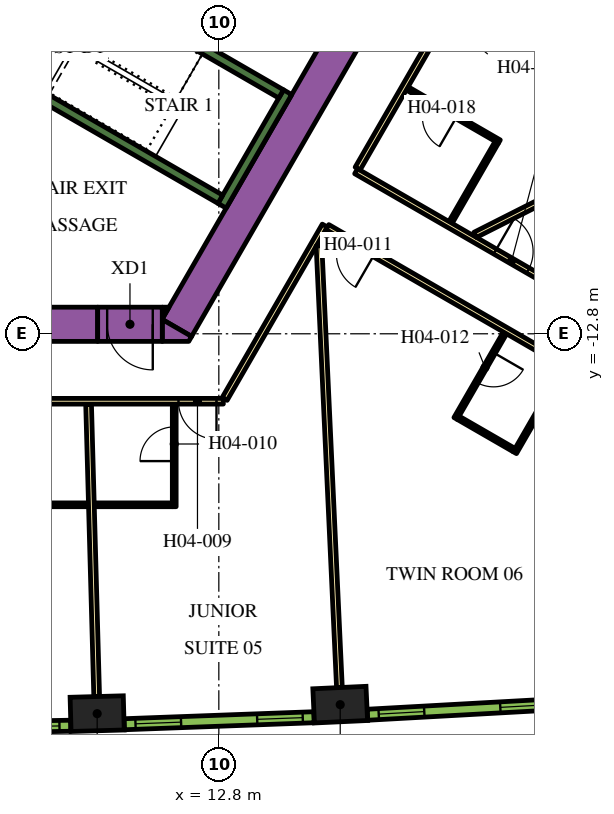
"""IFC4 building model, lengths in metres.
Left out: names, types, materials, properties, quantities, classifications, styles, units other than length and angle.
Written with IfcOpenShell. Run it as: python <this file> out.ifc"""

import sys

from ifc_helpers import new_model, si_unit, direction, frame, frame_2d, origin, origin_2d, place, context, subcontext, project, spatial, polyline, rectangle, outline, extrude, element, fill, save


model = new_model("IFC4")
c1 = context("Model", 3, precision=1e-05, world=origin(), true_north=direction((0.0, 1.0)))
c2 = subcontext(c1, "Body", "Model", "MODEL_VIEW")
j1 = project(units=[si_unit("LENGTHUNIT", "METRE"), si_unit("PLANEANGLEUNIT", "RADIAN")], contexts=[c1])
p1 = place(None, origin())
s1 = spatial("IfcSite", under=j1, at=p1, CompositionType="ELEMENT")
p2 = place(p1, origin())
s2 = spatial("IfcBuilding", under=s1, at=p2, CompositionType="ELEMENT")
p3 = place(p2, frame((0.0, 0.0, 62.7)))
s3 = spatial("IfcBuildingStorey", under=s2, at=p3, CompositionType="ELEMENT", Elevation=62.7)
for number, where, z_axis, x_axis in (
    (1, (9.599, -22.795, 0.0), (0.0, 0.0, 1.0), (1.0, 0.028, 0.0)),
    (2, (15.994, -22.558, 0.0), (0.0, 0.0, 1.0), (0.999, 0.046, 0.0)),
):
    element("IfcColumn", number, at=place(p3, frame(where, z_axis=z_axis, x_axis=x_axis)), inside=s3, PredefinedType="COLUMN", context=c2, shape_type="SweptSolid", body=[
        extrude(rectangle(XDim=1.4, YDim=0.9, at=origin_2d()), origin(), (0.0, 0.0, 1.0), 3.9),
    ])
p4 = place(p3, frame((11.695, -12.644, 0.0), z_axis=(0.0, 0.0, 1.0), x_axis=(0.500010229568, 0.86601949766, 0.0)))
e3 = element("IfcWall", 3, at=p4, inside=s3, PredefinedType="SOLIDWALL", context=c2, shape_type="SweptSolid", body=[
    extrude(rectangle(XDim=9.326, YDim=0.9, at=frame_2d((4.663, 0.0))), origin(), (0.0, 0.0, 1.0), 3.9),
])
p5 = place(p3, origin())
e4 = element("IfcWall", 4, at=p5, inside=s3, PredefinedType="SOLIDWALL", context=c2, shape_type="SweptSolid", body=[
    extrude(outline(polyline([(12.009, -13.0), (11.312, -13.0), (11.312, -12.425), (12.083, -12.871), (12.009, -13.0)])), origin(), (0.0, 0.0, 1.0), 3.9),
])
e5 = element("IfcWall", 5, at=p5, inside=s3, PredefinedType="SOLIDWALL", context=c2, shape_type="SweptSolid", body=[
    extrude(outline(polyline([(11.489, -12.1), (11.312, -12.407), (11.312, -12.1), (11.489, -12.1)])), origin(), (0.0, 0.0, 1.0), 3.9),
])
p6 = place(p3, frame((-12.019, -12.55, 0.0), z_axis=(0.0, 0.0, 1.0), x_axis=(1.0, 0.0, 0.0)))
e6 = element("IfcWall", 6, at=p6, inside=s3, PredefinedType="SOLIDWALL", context=c2, shape_type="SweptSolid", body=[
    extrude(rectangle(XDim=21.63, YDim=0.9, at=frame_2d((10.815, 0.0))), origin(), (0.0, 0.0, 1.0), 3.9),
])
p7 = place(p3, frame((12.885, -9.431, 0.0), z_axis=(0.0, 0.0, 1.0), x_axis=(0.500020560727, 0.866013532718, 0.0)))
e7 = element("IfcWall", 7, at=p7, inside=s3, PredefinedType="SOLIDWALL", context=c2, shape_type="SweptSolid", body=[
    extrude(rectangle(XDim=3.45, YDim=0.25, at=frame_2d((1.725, 0.0))), origin(), (0.0, 0.0, 1.0), 3.9),
])
p8 = place(p3, frame((12.84, -9.261, 0.0), z_axis=(0.0, 0.0, 1.0), x_axis=(-0.866013990052, 0.500019768644, 0.0)))
e8 = element("IfcWall", 8, at=p8, inside=s3, PredefinedType="SOLIDWALL", context=c2, shape_type="SweptSolid", body=[
    extrude(rectangle(XDim=6.8, YDim=0.25, at=frame_2d((3.4, 0.0))), origin(), (0.0, 0.0, 1.0), 3.9),
])
p9 = place(p3, frame((8.334, -2.964, 0.0), z_axis=(0.0, 0.0, 1.0), x_axis=(0.866016039709, -0.500016218704, 0.0)))
e9 = element("IfcWall", 9, at=p9, inside=s3, PredefinedType="SOLIDWALL", context=c2, shape_type="SweptSolid", body=[
    extrude(rectangle(XDim=7.05, YDim=0.25, at=frame_2d((3.525, 0.0))), origin(), (0.0, 0.0, 1.0), 3.9),
])
p10 = place(p3, frame((11.312, -12.55, 0.0), z_axis=(0.0, 0.0, 1.0), x_axis=(-1.0, 0.0, 0.0)))
e10 = element("IfcWall", 10, at=p10, inside=s3, PredefinedType="SOLIDWALL", context=c2, shape_type="SweptSolid", body=[
    extrude(rectangle(XDim=1.7, YDim=0.9, at=frame_2d((0.85, 0.0))), origin(), (0.0, 0.0, 1.0), 3.9),
])
p11 = place(p10, frame((0.25, 0.0, 0.0)))
e11 = element("IfcOpeningElement", 11, at=p11, cuts=e10, PredefinedType="OPENING", context=c2, shape_type="SweptSolid", body=[
    extrude(rectangle(XDim=1.2, YDim=2.1, at=frame_2d((0.6, 1.05))), frame((0.0, 0.46, 0.0), z_axis=(0.0, -1.0, 0.0), x_axis=(1.0, 0.0, 0.0)), (0.0, 0.0, 1.0), 0.92),
])
p12 = place(p3, frame((16.412, -8.523, 0.0), z_axis=(0.0, 0.0, 1.0), x_axis=(0.866022197818, -0.500005552856, 0.0)))
e12 = element("IfcWall", 12, at=p12, inside=s3, PredefinedType="PARTITIONING", context=c2, shape_type="SweptSolid", body=[
    extrude(rectangle(XDim=16.224, YDim=0.15, at=frame_2d((8.112, 0.0))), origin(), (0.0, 0.0, 1.0), 2.75),
])
p13 = place(p12, frame((4.223, 0.0, 0.0)))
e13 = element("IfcOpeningElement", 13, at=p13, cuts=e12, PredefinedType="OPENING", context=c2, shape_type="SweptSolid", body=[
    extrude(rectangle(XDim=1.0, YDim=2.1, at=frame_2d((0.5, 1.05))), frame((0.0, 0.085, 0.0), z_axis=(0.0, -1.0, 0.0), x_axis=(1.0, 0.0, 0.0)), (0.0, 0.0, 1.0), 0.17),
])
p14 = place(p3, frame((19.081, -3.9, 0.0), z_axis=(0.0, 0.0, 1.0), x_axis=(-0.499974327079, -0.866040225545, 0.0)))
e14 = element("IfcWall", 14, at=p14, inside=s3, PredefinedType="PARTITIONING", context=c2, shape_type="SweptSolid", body=[
    extrude(rectangle(XDim=5.258, YDim=0.15, at=frame_2d((2.629, 0.0))), origin(), (0.0, 0.0, 1.0), 2.75),
])
p15 = place(p14, frame((0.18, 0.0, 0.0)))
e15 = element("IfcOpeningElement", 15, at=p15, cuts=e14, PredefinedType="OPENING", context=c2, shape_type="SweptSolid", body=[
    extrude(rectangle(XDim=1.0, YDim=2.1, at=frame_2d((0.5, 1.05))), frame((0.0, 0.085, 0.0), z_axis=(0.0, -1.0, 0.0), x_axis=(1.0, 0.0, 0.0)), (0.0, 0.0, 1.0), 0.17),
])
p16 = place(p3, frame((12.918, -14.575, 0.0), z_axis=(0.0, 0.0, 1.0), x_axis=(-1.0, 0.0, 0.0)))
e16 = element("IfcWall", 16, at=p16, inside=s3, PredefinedType="PARTITIONING", context=c2, shape_type="SweptSolid", body=[
    extrude(rectangle(XDim=25.766, YDim=0.15, at=frame_2d((12.883, 0.0))), origin(), (0.0, 0.0, 1.0), 2.75),
])
p17 = place(p16, frame((24.586, 0.0, 0.0)))
e17 = element("IfcOpeningElement", 17, at=p17, cuts=e16, PredefinedType="OPENING", context=c2, shape_type="SweptSolid", body=[
    extrude(rectangle(XDim=1.0, YDim=2.1, at=frame_2d((0.5, 1.05))), frame((0.0, 0.085, 0.0), z_axis=(0.0, -1.0, 0.0), x_axis=(1.0, 0.0, 0.0)), (0.0, 0.0, 1.0), 0.17),
])
p18 = place(p16, frame((9.948, 0.0, 0.0)))
e18 = element("IfcOpeningElement", 18, at=p18, cuts=e16, PredefinedType="OPENING", context=c2, shape_type="SweptSolid", body=[
    extrude(rectangle(XDim=1.0, YDim=2.1, at=frame_2d((0.5, 1.05))), frame((0.0, 0.085, 0.0), z_axis=(0.0, -1.0, 0.0), x_axis=(1.0, 0.0, 0.0)), (0.0, 0.0, 1.0), 0.17),
])
p19 = place(p16, frame((8.642, 0.0, 0.0)))
e19 = element("IfcOpeningElement", 19, at=p19, cuts=e16, PredefinedType="OPENING", context=c2, shape_type="SweptSolid", body=[
    extrude(rectangle(XDim=1.0, YDim=2.1, at=frame_2d((0.5, 1.05))), frame((0.0, 0.085, 0.0), z_axis=(0.0, -1.0, 0.0), x_axis=(1.0, 0.0, 0.0)), (0.0, 0.0, 1.0), 0.17),
])
p20 = place(p16, frame((0.18, 0.0, 0.0)))
e20 = element("IfcOpeningElement", 20, at=p20, cuts=e16, PredefinedType="OPENING", context=c2, shape_type="SweptSolid", body=[
    extrude(rectangle(XDim=1.0, YDim=2.1, at=frame_2d((0.5, 1.05))), frame((0.0, 0.085, 0.0), z_axis=(0.0, -1.0, 0.0), x_axis=(1.0, 0.0, 0.0)), (0.0, 0.0, 1.0), 0.17),
])
p21 = place(p3, frame((15.587, -9.952, 0.0), z_axis=(0.0, 0.0, 1.0), x_axis=(-0.500016618951, -0.866015808616, 0.0)))
e21 = element("IfcWall", 21, at=p21, inside=s3, PredefinedType="PARTITIONING", context=c2, shape_type="SweptSolid", body=[
    extrude(rectangle(XDim=5.268, YDim=0.15, at=frame_2d((2.634, 0.0))), origin(), (0.0, 0.0, 1.0), 2.75),
])
p22 = place(p3, frame((29.638, -18.064, 0.0), z_axis=(0.0, 0.0, 1.0), x_axis=(-0.866026175601, 0.499998663172, 0.0)))
e22 = element("IfcWall", 22, at=p22, inside=s3, PredefinedType="PARTITIONING", context=c2, shape_type="SweptSolid", body=[
    extrude(rectangle(XDim=16.144, YDim=0.15, at=frame_2d((8.072, 0.0))), origin(), (0.0, 0.0, 1.0), 2.75),
])
p23 = place(p22, frame((14.714, 0.0, 0.0)))
e23 = element("IfcOpeningElement", 23, at=p23, cuts=e22, PredefinedType="OPENING", context=c2, shape_type="SweptSolid", body=[
    extrude(rectangle(XDim=1.0, YDim=2.1, at=frame_2d((0.5, 1.05))), frame((0.0, 0.085, 0.0), z_axis=(0.0, -1.0, 0.0), x_axis=(1.0, 0.0, 0.0)), (0.0, 0.0, 1.0), 0.17),
])
p24 = place(p22, frame((7.275, 0.0, 0.0)))
e24 = element("IfcOpeningElement", 24, at=p24, cuts=e22, PredefinedType="OPENING", context=c2, shape_type="SweptSolid", body=[
    extrude(rectangle(XDim=1.0, YDim=2.1, at=frame_2d((0.5, 1.05))), frame((0.0, 0.085, 0.0), z_axis=(0.0, -1.0, 0.0), x_axis=(1.0, 0.0, 0.0)), (0.0, 0.0, 1.0), 0.17),
])
p25 = place(p3, frame((9.586, -22.345, 0.0), z_axis=(0.0, 0.0, 1.0), x_axis=(-0.027722115646, 0.999615668297, 0.0)))
e25 = element("IfcWall", 25, at=p25, inside=s3, PredefinedType="PARTITIONING", context=c2, shape_type="SweptSolid", body=[
    extrude(rectangle(XDim=7.688, YDim=0.15, at=frame_2d((3.844, 0.0))), origin(), (0.0, 0.0, 1.0), 2.75),
])
p26 = place(p3, frame((15.973, -22.109, 0.0), z_axis=(0.0, 0.0, 1.0), x_axis=(-0.046191717129, 0.998932592955, 0.0)))
e26 = element("IfcWall", 26, at=p26, inside=s3, PredefinedType="PARTITIONING", context=c2, shape_type="SweptSolid", body=[
    extrude(rectangle(XDim=11.638, YDim=0.15, at=frame_2d((5.819, 0.0))), origin(), (0.0, 0.0, 1.0), 2.75),
])
p27 = place(p3, frame((29.12, -5.356, 0.0), z_axis=(0.0, 0.0, 1.0), x_axis=(-0.892401965553, -0.451241323327, 0.0)))
e27 = element("IfcWall", 27, at=p27, inside=s3, PredefinedType="PARTITIONING", context=c2, shape_type="SweptSolid", body=[
    extrude(rectangle(XDim=10.729, YDim=0.15, at=frame_2d((5.364, 0.0))), origin(), (0.0, 0.0, 1.0), 2.75),
])
p28 = place(p3, frame((7.169, -17.3, 0.0), z_axis=(0.0, 0.0, 1.0), x_axis=(1.0, 0.0, 0.0)))
e28 = element("IfcWall", 28, at=p28, inside=s3, PredefinedType="PARTITIONING", context=c2, shape_type="SweptSolid", body=[
    extrude(rectangle(XDim=2.2, YDim=0.1, at=frame_2d((1.1, 0.0))), origin(), (0.0, 0.0, 1.0), 2.75),
])
p29 = place(p3, frame((11.627, -17.35, 0.0), z_axis=(0.0, 0.0, 1.0), x_axis=(0.0, 1.0, 0.0)))
e29 = element("IfcWall", 29, at=p29, inside=s3, PredefinedType="PARTITIONING", context=c2, shape_type="SweptSolid", body=[
    extrude(rectangle(XDim=2.7, YDim=0.1, at=frame_2d((1.35, 0.0))), origin(), (0.0, 0.0, 1.0), 2.75),
])
p30 = place(p29, frame((1.2, 0.0, 0.0)))
e30 = element("IfcOpeningElement", 30, at=p30, cuts=e29, PredefinedType="OPENING", context=c2, shape_type="SweptSolid", body=[
    extrude(rectangle(XDim=0.9, YDim=2.1, at=frame_2d((0.45, 1.05))), frame((0.0, 0.06, 0.0), z_axis=(0.0, -1.0, 0.0), x_axis=(1.0, 0.0, 0.0)), (0.0, 0.0, 1.0), 0.12),
])
p31 = place(p3, frame((11.577, -17.3, 0.0), z_axis=(0.0, 0.0, 1.0), x_axis=(-1.0, 0.0, 0.0)))
e31 = element("IfcWall", 31, at=p31, inside=s3, PredefinedType="PARTITIONING", context=c2, shape_type="SweptSolid", body=[
    extrude(rectangle(XDim=2.05, YDim=0.1, at=frame_2d((1.025, 0.0))), origin(), (0.0, 0.0, 1.0), 2.75),
])
p32 = place(p3, frame((20.33, -12.777, 0.0), z_axis=(0.0, 0.0, 1.0), x_axis=(-0.500006934395, -0.866021400173, 0.0)))
e32 = element("IfcWall", 32, at=p32, inside=s3, PredefinedType="PARTITIONING", context=c2, shape_type="SweptSolid", body=[
    extrude(rectangle(XDim=2.6, YDim=0.1, at=frame_2d((1.3, 0.0))), origin(), (0.0, 0.0, 1.0), 2.75),
])
p33 = place(p32, frame((0.6, 0.0, 0.0)))
e33 = element("IfcOpeningElement", 33, at=p33, cuts=e32, PredefinedType="OPENING", context=c2, shape_type="SweptSolid", body=[
    extrude(rectangle(XDim=0.9, YDim=2.1, at=frame_2d((0.45, 1.05))), frame((0.0, 0.06, 0.0), z_axis=(0.0, -1.0, 0.0), x_axis=(1.0, 0.0, 0.0)), (0.0, 0.0, 1.0), 0.12),
])
p34 = place(p3, frame((19.098, -15.01, 0.0), z_axis=(0.0, 0.0, 1.0), x_axis=(0.86605165483, -0.499954529098, 0.0)))
e34 = element("IfcWall", 34, at=p34, inside=s3, PredefinedType="PARTITIONING", context=c2, shape_type="SweptSolid", body=[
    extrude(rectangle(XDim=1.7, YDim=0.1, at=frame_2d((0.85, 0.0))), origin(), (0.0, 0.0, 1.0), 2.75),
])
p35 = place(p3, frame((21.734, -13.945, 0.0), z_axis=(0.0, 0.0, 1.0), x_axis=(-0.500014693593, -0.866016920268, 0.0)))
e35 = element("IfcWall", 35, at=p35, inside=s3, PredefinedType="PARTITIONING", context=c2, shape_type="SweptSolid", body=[
    extrude(rectangle(XDim=2.29, YDim=0.1, at=frame_2d((1.145, 0.0))), origin(), (0.0, 0.0, 1.0), 2.75),
])
p36 = place(p3, frame((20.182, -7.743, 0.0), z_axis=(0.0, 0.0, 1.0), x_axis=(-0.866034573852, 0.49998411664, 0.0)))
e36 = element("IfcWall", 36, at=p36, inside=s3, PredefinedType="PARTITIONING", context=c2, shape_type="SweptSolid", body=[
    extrude(rectangle(XDim=2.8, YDim=0.1, at=frame_2d((1.4, 0.0))), origin(), (0.0, 0.0, 1.0), 2.75),
])
p37 = place(p36, frame((1.3, 0.0, 0.0)))
e37 = element("IfcOpeningElement", 37, at=p37, cuts=e36, PredefinedType="OPENING", context=c2, shape_type="SweptSolid", body=[
    extrude(rectangle(XDim=0.9, YDim=2.1, at=frame_2d((0.45, 1.05))), frame((0.0, 0.06, 0.0), z_axis=(0.0, -1.0, 0.0), x_axis=(1.0, 0.0, 0.0)), (0.0, 0.0, 1.0), 0.12),
])
p38 = place(p3, frame((20.109, -7.771, 0.0), z_axis=(0.0, 0.0, 1.0), x_axis=(-0.500077573772, -0.865980611914, 0.0)))
e38 = element("IfcWall", 38, at=p38, inside=s3, PredefinedType="PARTITIONING", context=c2, shape_type="SweptSolid", body=[
    extrude(rectangle(XDim=2.42, YDim=0.1, at=frame_2d((1.21, 0.0))), origin(), (0.0, 0.0, 1.0), 2.75),
])
p39 = place(p3, frame((3.906, -23.205, 0.0), z_axis=(0.0, 0.0, 1.0), x_axis=(0.999829529479, 0.018463801951, 0.0)))
e39 = element("IfcWall", 39, at=p39, inside=s3, PredefinedType="SOLIDWALL", context=c2, shape_type="SweptSolid", body=[
    extrude(rectangle(XDim=4.998, YDim=0.29, at=frame_2d((2.499, 0.0))), origin(), (0.0, 0.0, 1.0), 3.65),
])
p40 = place(p39, frame((0.297, 0.0, 0.9)))
e40 = element("IfcOpeningElement", 40, at=p40, cuts=e39, PredefinedType="OPENING", context=c2, shape_type="SweptSolid", body=[
    extrude(rectangle(XDim=1.2, YDim=2.15, at=frame_2d((0.6, 1.075))), frame((0.0, 0.155, 0.0), z_axis=(0.0, -1.0, 0.0), x_axis=(1.0, 0.0, 0.0)), (0.0, 0.0, 1.0), 0.31),
])
p41 = place(p39, frame((3.501, 0.0, 0.9)))
e41 = element("IfcOpeningElement", 41, at=p41, cuts=e39, PredefinedType="OPENING", context=c2, shape_type="SweptSolid", body=[
    extrude(rectangle(XDim=1.2, YDim=2.15, at=frame_2d((0.6, 1.075))), frame((0.0, 0.155, 0.0), z_axis=(0.0, -1.0, 0.0), x_axis=(1.0, 0.0, 0.0)), (0.0, 0.0, 1.0), 0.31),
])
p42 = place(p3, frame((10.31, -23.074, 0.0), z_axis=(0.0, 0.0, 1.0), x_axis=(0.999317974969, 0.036926750529, 0.0)))
e42 = element("IfcWall", 42, at=p42, inside=s3, PredefinedType="SOLIDWALL", context=c2, shape_type="SweptSolid", body=[
    extrude(rectangle(XDim=4.998, YDim=0.29, at=frame_2d((2.499, 0.0))), origin(), (0.0, 0.0, 1.0), 3.65),
])
p43 = place(p42, frame((0.297, 0.0, 0.9)))
e43 = element("IfcOpeningElement", 43, at=p43, cuts=e42, PredefinedType="OPENING", context=c2, shape_type="SweptSolid", body=[
    extrude(rectangle(XDim=1.2, YDim=2.15, at=frame_2d((0.6, 1.075))), frame((0.0, 0.155, 0.0), z_axis=(0.0, -1.0, 0.0), x_axis=(1.0, 0.0, 0.0)), (0.0, 0.0, 1.0), 0.31),
])
p44 = place(p42, frame((3.501, 0.0, 0.9)))
e44 = element("IfcOpeningElement", 44, at=p44, cuts=e42, PredefinedType="OPENING", context=c2, shape_type="SweptSolid", body=[
    extrude(rectangle(XDim=1.2, YDim=2.15, at=frame_2d((0.6, 1.075))), frame((0.0, 0.155, 0.0), z_axis=(0.0, -1.0, 0.0), x_axis=(1.0, 0.0, 0.0)), (0.0, 0.0, 1.0), 0.31),
])
p45 = place(p3, frame((16.711, -22.824, 0.0), z_axis=(0.0, 0.0, 1.0), x_axis=(0.998464708705, 0.055391564976, 0.0)))
e45 = element("IfcWall", 45, at=p45, inside=s3, PredefinedType="SOLIDWALL", context=c2, shape_type="SweptSolid", body=[
    extrude(rectangle(XDim=4.998, YDim=0.29, at=frame_2d((2.499, 0.0))), origin(), (0.0, 0.0, 1.0), 3.65),
])
p46 = place(p45, frame((0.297, 0.0, 0.9)))
e46 = element("IfcOpeningElement", 46, at=p46, cuts=e45, PredefinedType="OPENING", context=c2, shape_type="SweptSolid", body=[
    extrude(rectangle(XDim=1.2, YDim=2.15, at=frame_2d((0.6, 1.075))), frame((0.0, 0.155, 0.0), z_axis=(0.0, -1.0, 0.0), x_axis=(1.0, 0.0, 0.0)), (0.0, 0.0, 1.0), 0.31),
])
p47 = place(p45, frame((3.501, 0.0, 0.9)))
e47 = element("IfcOpeningElement", 47, at=p47, cuts=e45, PredefinedType="OPENING", context=c2, shape_type="SweptSolid", body=[
    extrude(rectangle(XDim=1.2, YDim=2.15, at=frame_2d((0.6, 1.075))), frame((0.0, 0.155, 0.0), z_axis=(0.0, -1.0, 0.0), x_axis=(1.0, 0.0, 0.0)), (0.0, 0.0, 1.0), 0.31),
])
p48 = place(p11, origin())
e48 = element("IfcDoor", 48, at=p48, inside=s3, OperationType="SINGLE_SWING_LEFT", PredefinedType="DOOR", context=c2, shape_type="SweptSolid", body=[
    extrude(rectangle(XDim=1.2, YDim=2.1, at=frame_2d((0.6, 1.05))), frame((0.0, 0.025, 0.0), z_axis=(0.0, -1.0, 0.0), x_axis=(1.0, 0.0, 0.0)), (0.0, 0.0, 1.0), 0.05),
])
fill(e11, e48)
p49 = place(p20, origin())
e49 = element("IfcDoor", 49, at=p49, inside=s3, OperationType="SINGLE_SWING_LEFT", PredefinedType="DOOR", context=c2, shape_type="SweptSolid", body=[
    extrude(rectangle(XDim=1.0, YDim=2.1, at=frame_2d((0.5, 1.05))), frame((0.0, 0.025, 0.0), z_axis=(0.0, -1.0, 0.0), x_axis=(1.0, 0.0, 0.0)), (0.0, 0.0, 1.0), 0.05),
])
fill(e20, e49)
p50 = place(p30, origin())
e50 = element("IfcDoor", 50, at=p50, inside=s3, OperationType="SINGLE_SWING_LEFT", PredefinedType="DOOR", context=c2, shape_type="SweptSolid", body=[
    extrude(rectangle(XDim=0.9, YDim=2.1, at=frame_2d((0.45, 1.05))), frame((0.0, 0.025, 0.0), z_axis=(0.0, -1.0, 0.0), x_axis=(1.0, 0.0, 0.0)), (0.0, 0.0, 1.0), 0.05),
])
fill(e30, e50)
p51 = place(p23, origin())
e51 = element("IfcDoor", 51, at=p51, inside=s3, OperationType="SINGLE_SWING_RIGHT", PredefinedType="DOOR", context=c2, shape_type="SweptSolid", body=[
    extrude(rectangle(XDim=1.0, YDim=2.1, at=frame_2d((0.5, 1.05))), frame((0.0, 0.025, 0.0), z_axis=(0.0, -1.0, 0.0), x_axis=(1.0, 0.0, 0.0)), (0.0, 0.0, 1.0), 0.05),
])
fill(e23, e51)
p52 = place(p33, origin())
e52 = element("IfcDoor", 52, at=p52, inside=s3, OperationType="SINGLE_SWING_RIGHT", PredefinedType="DOOR", context=c2, shape_type="SweptSolid", body=[
    extrude(rectangle(XDim=0.9, YDim=2.1, at=frame_2d((0.45, 1.05))), frame((0.0, 0.025, 0.0), z_axis=(0.0, -1.0, 0.0), x_axis=(1.0, 0.0, 0.0)), (0.0, 0.0, 1.0), 0.05),
])
fill(e33, e52)
p53 = place(p13, origin())
e53 = element("IfcDoor", 53, at=p53, inside=s3, OperationType="SINGLE_SWING_LEFT", PredefinedType="DOOR", context=c2, shape_type="SweptSolid", body=[
    extrude(rectangle(XDim=1.0, YDim=2.1, at=frame_2d((0.5, 1.05))), frame((0.0, 0.025, 0.0), z_axis=(0.0, -1.0, 0.0), x_axis=(1.0, 0.0, 0.0)), (0.0, 0.0, 1.0), 0.05),
])
fill(e13, e53)
p54 = place(p37, origin())
e54 = element("IfcDoor", 54, at=p54, inside=s3, OperationType="SINGLE_SWING_RIGHT", PredefinedType="DOOR", context=c2, shape_type="SweptSolid", body=[
    extrude(rectangle(XDim=0.9, YDim=2.1, at=frame_2d((0.45, 1.05))), frame((0.0, 0.025, 0.0), z_axis=(0.0, -1.0, 0.0), x_axis=(1.0, 0.0, 0.0)), (0.0, 0.0, 1.0), 0.05),
])
fill(e37, e54)
p55 = place(p41, origin())
e55 = element("IfcWindow", 55, at=p55, inside=s3, PartitioningType="DOUBLE_PANEL_VERTICAL", PredefinedType="WINDOW", context=c2, shape_type="SweptSolid", body=[
    extrude(rectangle(XDim=1.2, YDim=2.15, at=frame_2d((0.6, 1.075))), frame((0.0, 0.015, 0.0), z_axis=(0.0, -1.0, 0.0), x_axis=(1.0, 0.0, 0.0)), (0.0, 0.0, 1.0), 0.06),
])
fill(e41, e55)
p56 = place(p43, origin())
e56 = element("IfcWindow", 56, at=p56, inside=s3, PartitioningType="DOUBLE_PANEL_VERTICAL", PredefinedType="WINDOW", context=c2, shape_type="SweptSolid", body=[
    extrude(rectangle(XDim=1.2, YDim=2.15, at=frame_2d((0.6, 1.075))), frame((0.0, 0.015, 0.0), z_axis=(0.0, -1.0, 0.0), x_axis=(1.0, 0.0, 0.0)), (0.0, 0.0, 1.0), 0.06),
])
fill(e43, e56)
p57 = place(p44, origin())
e57 = element("IfcWindow", 57, at=p57, inside=s3, PartitioningType="DOUBLE_PANEL_VERTICAL", PredefinedType="WINDOW", context=c2, shape_type="SweptSolid", body=[
    extrude(rectangle(XDim=1.2, YDim=2.15, at=frame_2d((0.6, 1.075))), frame((0.0, 0.015, 0.0), z_axis=(0.0, -1.0, 0.0), x_axis=(1.0, 0.0, 0.0)), (0.0, 0.0, 1.0), 0.06),
])
fill(e44, e57)
p58 = place(p46, origin())
e58 = element("IfcWindow", 58, at=p58, inside=s3, PartitioningType="DOUBLE_PANEL_VERTICAL", PredefinedType="WINDOW", context=c2, shape_type="SweptSolid", body=[
    extrude(rectangle(XDim=1.2, YDim=2.15, at=frame_2d((0.6, 1.075))), frame((0.0, 0.015, 0.0), z_axis=(0.0, -1.0, 0.0), x_axis=(1.0, 0.0, 0.0)), (0.0, 0.0, 1.0), 0.06),
])
fill(e46, e58)
p59 = place(p47, origin())
e59 = element("IfcWindow", 59, at=p59, inside=s3, PartitioningType="DOUBLE_PANEL_VERTICAL", PredefinedType="WINDOW", context=c2, shape_type="SweptSolid", body=[
    extrude(rectangle(XDim=1.2, YDim=2.15, at=frame_2d((0.6, 1.075))), frame((0.0, 0.015, 0.0), z_axis=(0.0, -1.0, 0.0), x_axis=(1.0, 0.0, 0.0)), (0.0, 0.0, 1.0), 0.06),
])
fill(e47, e59)
save(model, sys.argv[1])
